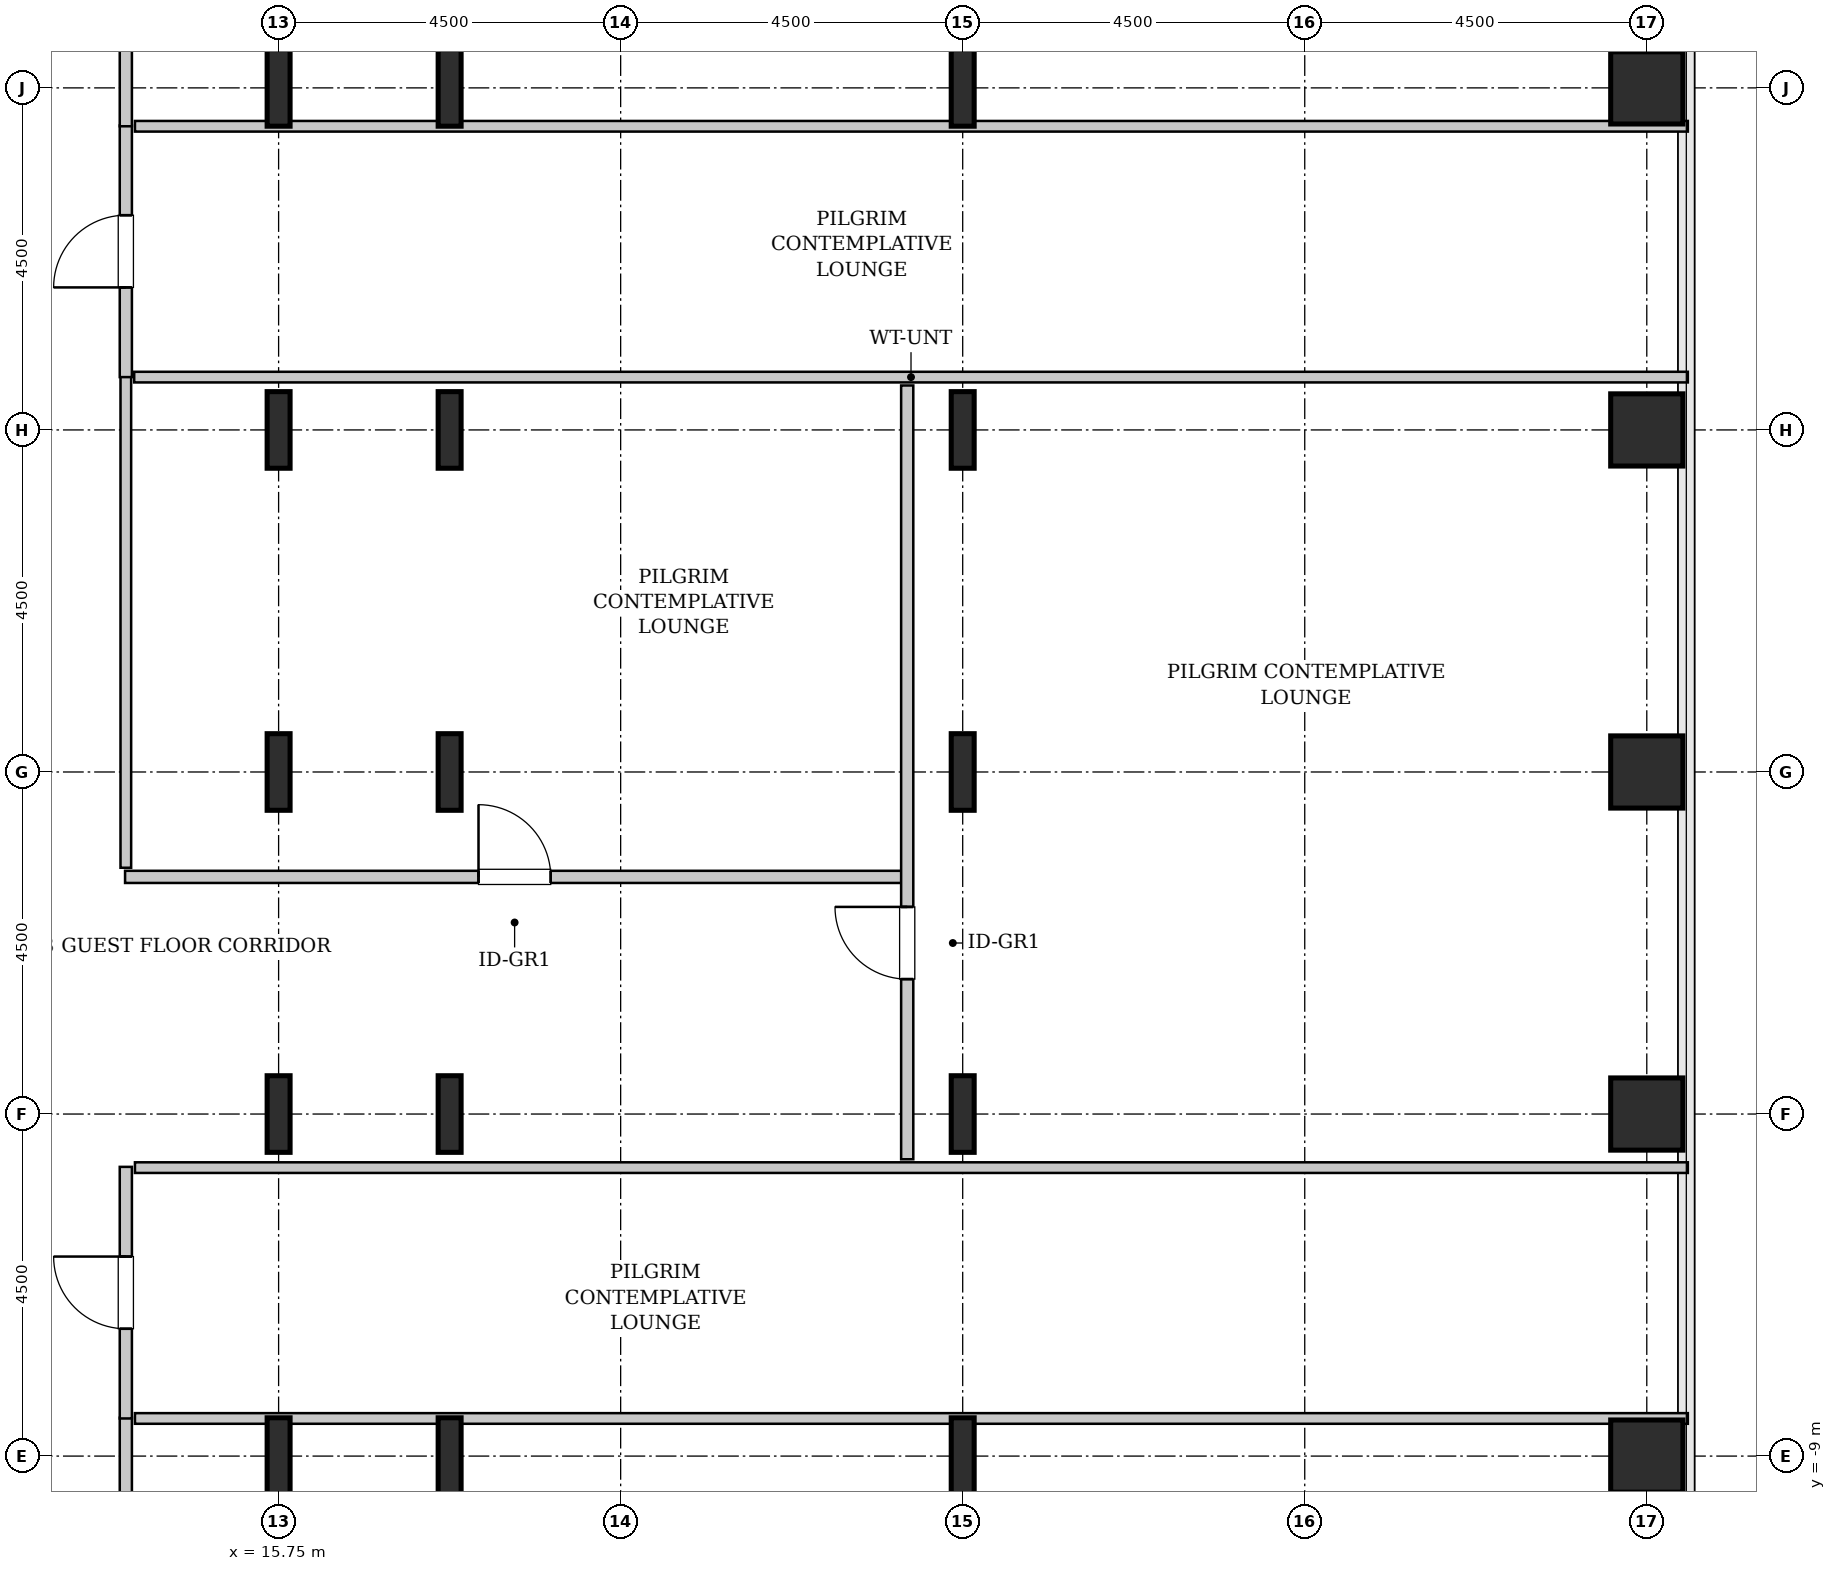
"""IFC4 building model, lengths in metres.
Left out: names, types, materials, properties, quantities, classifications, styles, units other than length and angle.
Written with IfcOpenShell. Run it as: python <this file> out.ifc"""

import sys

from ifc_helpers import new_model, si_unit, direction, frame, frame_2d, origin, origin_2d, place, context, subcontext, project, spatial, rectangle, hollow_rectangle, i_section, extrude, source, transform, mapped, element, fill, save


model = new_model("IFC4")
c1 = context("Model", 3, precision=1e-05, world=origin(), true_north=direction((0.0, 1.0)))
c2 = subcontext(c1, "Body", "Model", "MODEL_VIEW")
j1 = project(units=[si_unit("LENGTHUNIT", "METRE"), si_unit("PLANEANGLEUNIT", "RADIAN")], contexts=[c1])
p1 = place(None, origin())
s1 = spatial("IfcSite", under=j1, at=p1, CompositionType="ELEMENT")
p2 = place(p1, origin())
s2 = spatial("IfcBuilding", under=s1, at=p2, CompositionType="ELEMENT")
p3 = place(p2, frame((0.0, 0.0, 59.6)))
s3 = spatial("IfcBuildingStorey", under=s2, at=p3, CompositionType="ELEMENT", Elevation=59.6)
m1 = source(origin(), c2, "Body", "SweptSolid", [
    extrude(i_section(OverallWidth=0.302, OverallDepth=1.008, WebThickness=0.021, FlangeThickness=0.04, FilletRadius=0.03, at=origin_2d()), origin(), (0.0, 0.0, 1.0), 3.8),
])
for number, where, z_axis, x_axis in (
    (1, (15.75, -9.0, 0.0), (0.0, 0.0, 1.0), (1.0, 0.0, 0.0)),
    (2, (15.75, -4.5, 0.0), (0.0, 0.0, 1.0), (1.0, 0.0, 0.0)),
    (3, (15.75, 0.0, 0.0), (0.0, 0.0, 1.0), (1.0, 0.0, 0.0)),
    (4, (15.75, 4.5, 0.0), (0.0, 0.0, 1.0), (1.0, 0.0, 0.0)),
    (5, (15.75, 9.0, 0.0), (0.0, 0.0, 1.0), (1.0, 0.0, 0.0)),
    (6, (18.0, -9.0, 0.0), (0.0, 0.0, 1.0), (1.0, 0.0, 0.0)),
    (7, (18.0, -4.5, 0.0), (0.0, 0.0, 1.0), (1.0, 0.0, 0.0)),
    (8, (18.0, 0.0, 0.0), (0.0, 0.0, 1.0), (1.0, 0.0, 0.0)),
    (9, (18.0, 4.5, 0.0), (0.0, 0.0, 1.0), (1.0, 0.0, 0.0)),
    (10, (18.0, 9.0, 0.0), (0.0, 0.0, 1.0), (1.0, 0.0, 0.0)),
    (11, (24.75, -9.0, 0.0), (0.0, 0.0, 1.0), (1.0, 0.0, 0.0)),
    (12, (24.75, -4.5, 0.0), (0.0, 0.0, 1.0), (1.0, 0.0, 0.0)),
    (13, (24.75, 0.0, 0.0), (0.0, 0.0, 1.0), (1.0, 0.0, 0.0)),
    (14, (24.75, 4.5, 0.0), (0.0, 0.0, 1.0), (1.0, 0.0, 0.0)),
    (15, (24.75, 9.0, 0.0), (0.0, 0.0, 1.0), (1.0, 0.0, 0.0)),
):
    element("IfcColumn", number, at=place(p3, frame(where, z_axis=z_axis, x_axis=x_axis)), inside=s3, PredefinedType="COLUMN", context=c2, shape_type="MappedRepresentation", body=[
        mapped(m1, transform((0.0, 0.0, 0.0), x_axis=(1.0, 0.0, 0.0), y_axis=(0.0, 1.0, 0.0), z_axis=(0.0, 0.0, 1.0), scale=1.0)),
    ])
m2 = source(origin(), c2, "Body", "SweptSolid", [
    extrude(hollow_rectangle(XDim=0.95, YDim=0.95, WallThickness=0.045, InnerFilletRadius=0.045, OuterFilletRadius=0.09, at=origin_2d()), origin(), (0.0, 0.0, 1.0), 3.8),
])
for number, where, z_axis, x_axis in (
    (16, (33.75, -9.0, 0.0), (0.0, 0.0, 1.0), (1.0, 0.0, 0.0)),
    (17, (33.75, -4.5, 0.0), (0.0, 0.0, 1.0), (1.0, 0.0, 0.0)),
    (18, (33.75, 0.0, 0.0), (0.0, 0.0, 1.0), (1.0, 0.0, 0.0)),
    (19, (33.75, 4.5, 0.0), (0.0, 0.0, 1.0), (1.0, 0.0, 0.0)),
    (20, (33.75, 9.0, 0.0), (0.0, 0.0, 1.0), (1.0, 0.0, 0.0)),
):
    element("IfcColumn", number, at=place(p3, frame(where, z_axis=z_axis, x_axis=x_axis)), inside=s3, PredefinedType="COLUMN", context=c2, shape_type="MappedRepresentation", body=[
        mapped(m2, transform((0.0, 0.0, 0.0), x_axis=(1.0, 0.0, 0.0), y_axis=(0.0, 1.0, 0.0), z_axis=(0.0, 0.0, 1.0), scale=1.0)),
    ])
m3 = source(origin(), c2, "Body", "SweptSolid", [
    extrude(rectangle(XDim=14.545, YDim=0.16, at=frame_2d((7.272, 0.0))), origin(), (0.0, 0.0, 1.0), 3.535),
])
p4 = place(p3, frame((13.74, -23.04, 0.0), z_axis=(0.0, 0.0, 1.0), x_axis=(0.0, 1.0, 0.0)))
e21 = element("IfcWall", 21, at=p4, inside=s3, PredefinedType="PARTITIONING", context=c2, shape_type="MappedRepresentation", body=[
    mapped(m3, transform((0.0, 0.0, 0.0), x_axis=(1.0, 0.0, 0.0), y_axis=(0.0, 1.0, 0.0), z_axis=(0.0, 0.0, 1.0), scale=1.0)),
])
p5 = place(p4, frame((12.562, 0.0, 0.0)))
e22 = element("IfcOpeningElement", 22, at=p5, cuts=e21, PredefinedType="OPENING", context=c2, shape_type="SweptSolid", body=[
    extrude(rectangle(XDim=0.95, YDim=2.1, at=frame_2d((0.475, 1.05))), frame((0.0, 0.09, 0.0), z_axis=(0.0, -1.0, 0.0), x_axis=(1.0, 0.0, 0.0)), (0.0, 0.0, 1.0), 0.18),
])
m4 = source(origin(), c2, "Body", "SweptSolid", [
    extrude(rectangle(XDim=20.43, YDim=0.14, at=frame_2d((10.215, 0.0))), origin(), (0.0, 0.0, 1.0), 2.825),
])
p6 = place(p3, frame((13.86, -8.505, 0.0), z_axis=(0.0, 0.0, 1.0), x_axis=(1.0, 0.0, 0.0)))
e23 = element("IfcWall", 23, at=p6, inside=s3, PredefinedType="PARTITIONING", context=c2, shape_type="MappedRepresentation", body=[
    mapped(m4, transform((0.0, 0.0, 0.0), x_axis=(1.0, 0.0, 0.0), y_axis=(0.0, 1.0, 0.0), z_axis=(0.0, 0.0, 1.0), scale=1.0)),
])
m5 = source(origin(), c2, "Body", "SweptSolid", [
    extrude(rectangle(XDim=3.31, YDim=0.16, at=frame_2d((1.655, 0.0))), origin(), (0.0, 0.0, 1.0), 3.535),
])
p7 = place(p3, frame((13.74, -8.505, 0.0), z_axis=(0.0, 0.0, 1.0), x_axis=(0.0, 1.0, 0.0)))
e24 = element("IfcWall", 24, at=p7, inside=s3, PredefinedType="PARTITIONING", context=c2, shape_type="MappedRepresentation", body=[
    mapped(m5, transform((0.0, 0.0, 0.0), x_axis=(1.0, 0.0, 0.0), y_axis=(0.0, 1.0, 0.0), z_axis=(0.0, 0.0, 1.0), scale=1.0)),
])
p8 = place(p7, frame((1.18, 0.0, 0.0)))
e25 = element("IfcOpeningElement", 25, at=p8, cuts=e24, PredefinedType="OPENING", context=c2, shape_type="SweptSolid", body=[
    extrude(rectangle(XDim=0.95, YDim=2.1, at=frame_2d((0.475, 1.05))), frame((0.0, 0.09, 0.0), z_axis=(0.0, -1.0, 0.0), x_axis=(1.0, 0.0, 0.0)), (0.0, 0.0, 1.0), 0.18),
])
m6 = source(origin(), c2, "Body", "SweptSolid", [
    extrude(rectangle(XDim=20.43, YDim=0.14, at=frame_2d((10.215, 0.0))), origin(), (0.0, 0.0, 1.0), 3.535),
])
p9 = place(p3, frame((13.86, -5.205, 0.0), z_axis=(0.0, 0.0, 1.0), x_axis=(1.0, 0.0, 0.0)))
e26 = element("IfcWall", 26, at=p9, inside=s3, PredefinedType="PARTITIONING", context=c2, shape_type="MappedRepresentation", body=[
    mapped(m6, transform((0.0, 0.0, 0.0), x_axis=(1.0, 0.0, 0.0), y_axis=(0.0, 1.0, 0.0), z_axis=(0.0, 0.0, 1.0), scale=1.0)),
])
m7 = source(origin(), c2, "Body", "SweptSolid", [
    extrude(rectangle(XDim=10.25, YDim=0.16, at=frame_2d((5.125, 0.0))), origin(), (0.0, 0.0, 1.0), 3.535),
])
p10 = place(p3, frame((13.73, -1.38, 0.0), z_axis=(0.0, 0.0, 1.0), x_axis=(1.0, 0.0, 0.0)))
e27 = element("IfcWall", 27, at=p10, inside=s3, PredefinedType="PARTITIONING", context=c2, shape_type="MappedRepresentation", body=[
    mapped(m7, transform((0.0, 0.0, 0.0), x_axis=(1.0, 0.0, 0.0), y_axis=(0.0, 1.0, 0.0), z_axis=(0.0, 0.0, 1.0), scale=1.0)),
])
p11 = place(p10, frame((4.65, 0.0, 0.0)))
e28 = element("IfcOpeningElement", 28, at=p11, cuts=e27, PredefinedType="OPENING", context=c2, shape_type="SweptSolid", body=[
    extrude(rectangle(XDim=0.95, YDim=2.1, at=frame_2d((0.475, 1.05))), frame((0.0, 0.09, 0.0), z_axis=(0.0, -1.0, 0.0), x_axis=(1.0, 0.0, 0.0)), (0.0, 0.0, 1.0), 0.18),
])
m8 = source(origin(), c2, "Body", "SweptSolid", [
    extrude(rectangle(XDim=6.465, YDim=0.14, at=frame_2d((3.232, 0.0))), origin(), (0.0, 0.0, 1.0), 3.535),
])
p12 = place(p3, frame((13.74, -1.26, 0.0), z_axis=(0.0, 0.0, 1.0), x_axis=(0.0, 1.0, 0.0)))
e29 = element("IfcWall", 29, at=p12, inside=s3, PredefinedType="PARTITIONING", context=c2, shape_type="MappedRepresentation", body=[
    mapped(m8, transform((0.0, 0.0, 0.0), x_axis=(1.0, 0.0, 0.0), y_axis=(0.0, 1.0, 0.0), z_axis=(0.0, 0.0, 1.0), scale=1.0)),
])
m9 = source(origin(), c2, "Body", "SweptSolid", [
    extrude(rectangle(XDim=20.44, YDim=0.14, at=frame_2d((10.22, 0.0))), origin(), (0.0, 0.0, 1.0), 3.535),
])
p13 = place(p3, frame((13.85, 5.195, 0.0), z_axis=(0.0, 0.0, 1.0), x_axis=(1.0, 0.0, 0.0)))
e30 = element("IfcWall", 30, at=p13, inside=s3, PredefinedType="PARTITIONING", context=c2, shape_type="MappedRepresentation", body=[
    mapped(m9, transform((0.0, 0.0, 0.0), x_axis=(1.0, 0.0, 0.0), y_axis=(0.0, 1.0, 0.0), z_axis=(0.0, 0.0, 1.0), scale=1.0)),
])
m10 = source(origin(), c2, "Body", "SweptSolid", [
    extrude(rectangle(XDim=10.18, YDim=0.16, at=frame_2d((5.09, 0.0))), origin(), (0.0, 0.0, 1.0), 3.535),
])
p14 = place(p3, frame((24.02, -5.095, 0.0), z_axis=(0.0, 0.0, 1.0), x_axis=(0.0, 1.0, 0.0)))
e31 = element("IfcWall", 31, at=p14, inside=s3, PredefinedType="PARTITIONING", context=c2, shape_type="MappedRepresentation", body=[
    mapped(m10, transform((0.0, 0.0, 0.0), x_axis=(1.0, 0.0, 0.0), y_axis=(0.0, 1.0, 0.0), z_axis=(0.0, 0.0, 1.0), scale=1.0)),
])
p15 = place(p14, frame((2.37, 0.0, 0.0)))
e32 = element("IfcOpeningElement", 32, at=p15, cuts=e31, PredefinedType="OPENING", context=c2, shape_type="SweptSolid", body=[
    extrude(rectangle(XDim=0.95, YDim=2.1, at=frame_2d((0.475, 1.05))), frame((0.0, 0.09, 0.0), z_axis=(0.0, -1.0, 0.0), x_axis=(1.0, 0.0, 0.0)), (0.0, 0.0, 1.0), 0.18),
])
p16 = place(p3, frame((13.74, 5.195, 0.0), z_axis=(0.0, 0.0, 1.0), x_axis=(0.0, 1.0, 0.0)))
e33 = element("IfcWall", 33, at=p16, inside=s3, PredefinedType="PARTITIONING", context=c2, shape_type="MappedRepresentation", body=[
    mapped(m5, transform((0.0, 0.0, 0.0), x_axis=(1.0, 0.0, 0.0), y_axis=(0.0, 1.0, 0.0), z_axis=(0.0, 0.0, 1.0), scale=1.0)),
])
p17 = place(p16, frame((1.18, 0.0, 0.0)))
e34 = element("IfcOpeningElement", 34, at=p17, cuts=e33, PredefinedType="OPENING", context=c2, shape_type="SweptSolid", body=[
    extrude(rectangle(XDim=0.95, YDim=2.1, at=frame_2d((0.475, 1.05))), frame((0.0, 0.09, 0.0), z_axis=(0.0, -1.0, 0.0), x_axis=(1.0, 0.0, 0.0)), (0.0, 0.0, 1.0), 0.18),
])
p18 = place(p3, frame((13.86, 8.495, 0.0), z_axis=(0.0, 0.0, 1.0), x_axis=(1.0, 0.0, 0.0)))
e35 = element("IfcWall", 35, at=p18, inside=s3, PredefinedType="PARTITIONING", context=c2, shape_type="MappedRepresentation", body=[
    mapped(m4, transform((0.0, 0.0, 0.0), x_axis=(1.0, 0.0, 0.0), y_axis=(0.0, 1.0, 0.0), z_axis=(0.0, 0.0, 1.0), scale=1.0)),
])
p19 = place(p3, frame((13.74, 8.495, 0.0), z_axis=(0.0, 0.0, 1.0), x_axis=(0.0, 1.0, 0.0)))
e36 = element("IfcWall", 36, at=p19, inside=s3, PredefinedType="PARTITIONING", context=c2, shape_type="MappedRepresentation", body=[
    mapped(m3, transform((0.0, 0.0, 0.0), x_axis=(1.0, 0.0, 0.0), y_axis=(0.0, 1.0, 0.0), z_axis=(0.0, 0.0, 1.0), scale=1.0)),
])
p20 = place(p19, frame((1.032, 0.0, 0.0)))
e37 = element("IfcOpeningElement", 37, at=p20, cuts=e36, PredefinedType="OPENING", context=c2, shape_type="SweptSolid", body=[
    extrude(rectangle(XDim=0.95, YDim=2.1, at=frame_2d((0.475, 1.05))), frame((0.0, 0.09, 0.0), z_axis=(0.0, -1.0, 0.0), x_axis=(1.0, 0.0, 0.0)), (0.0, 0.0, 1.0), 0.18),
])
m11 = source(origin(), c2, "Body", "SweptSolid", [
    extrude(rectangle(XDim=0.95, YDim=2.1, at=frame_2d((0.475, 1.05))), frame((0.0, 0.025, 0.0), z_axis=(0.0, -1.0, 0.0), x_axis=(1.0, 0.0, 0.0)), (0.0, 0.0, 1.0), 0.05),
])
p21 = place(p8, origin())
e38 = element("IfcDoor", 38, at=p21, inside=s3, OperationType="SINGLE_SWING_RIGHT", PredefinedType="DOOR", context=c2, shape_type="MappedRepresentation", body=[
    mapped(m11, transform((0.0, 0.0, 0.0), x_axis=(1.0, 0.0, 0.0), y_axis=(0.0, 1.0, 0.0), z_axis=(0.0, 0.0, 1.0), scale=1.0)),
])
fill(e25, e38)
p22 = place(p11, origin())
e39 = element("IfcDoor", 39, at=p22, inside=s3, OperationType="SINGLE_SWING_LEFT", PredefinedType="DOOR", context=c2, shape_type="MappedRepresentation", body=[
    mapped(m11, transform((0.0, 0.0, 0.0), x_axis=(1.0, 0.0, 0.0), y_axis=(0.0, 1.0, 0.0), z_axis=(0.0, 0.0, 1.0), scale=1.0)),
])
fill(e28, e39)
p23 = place(p15, origin())
e40 = element("IfcDoor", 40, at=p23, inside=s3, OperationType="SINGLE_SWING_RIGHT", PredefinedType="DOOR", context=c2, shape_type="MappedRepresentation", body=[
    mapped(m11, transform((0.0, 0.0, 0.0), x_axis=(1.0, 0.0, 0.0), y_axis=(0.0, 1.0, 0.0), z_axis=(0.0, 0.0, 1.0), scale=1.0)),
])
fill(e32, e40)
p24 = place(p17, origin())
e41 = element("IfcDoor", 41, at=p24, inside=s3, OperationType="SINGLE_SWING_LEFT", PredefinedType="DOOR", context=c2, shape_type="MappedRepresentation", body=[
    mapped(m11, transform((0.0, 0.0, 0.0), x_axis=(1.0, 0.0, 0.0), y_axis=(0.0, 1.0, 0.0), z_axis=(0.0, 0.0, 1.0), scale=1.0)),
])
fill(e34, e41)
save(model, sys.argv[1])
